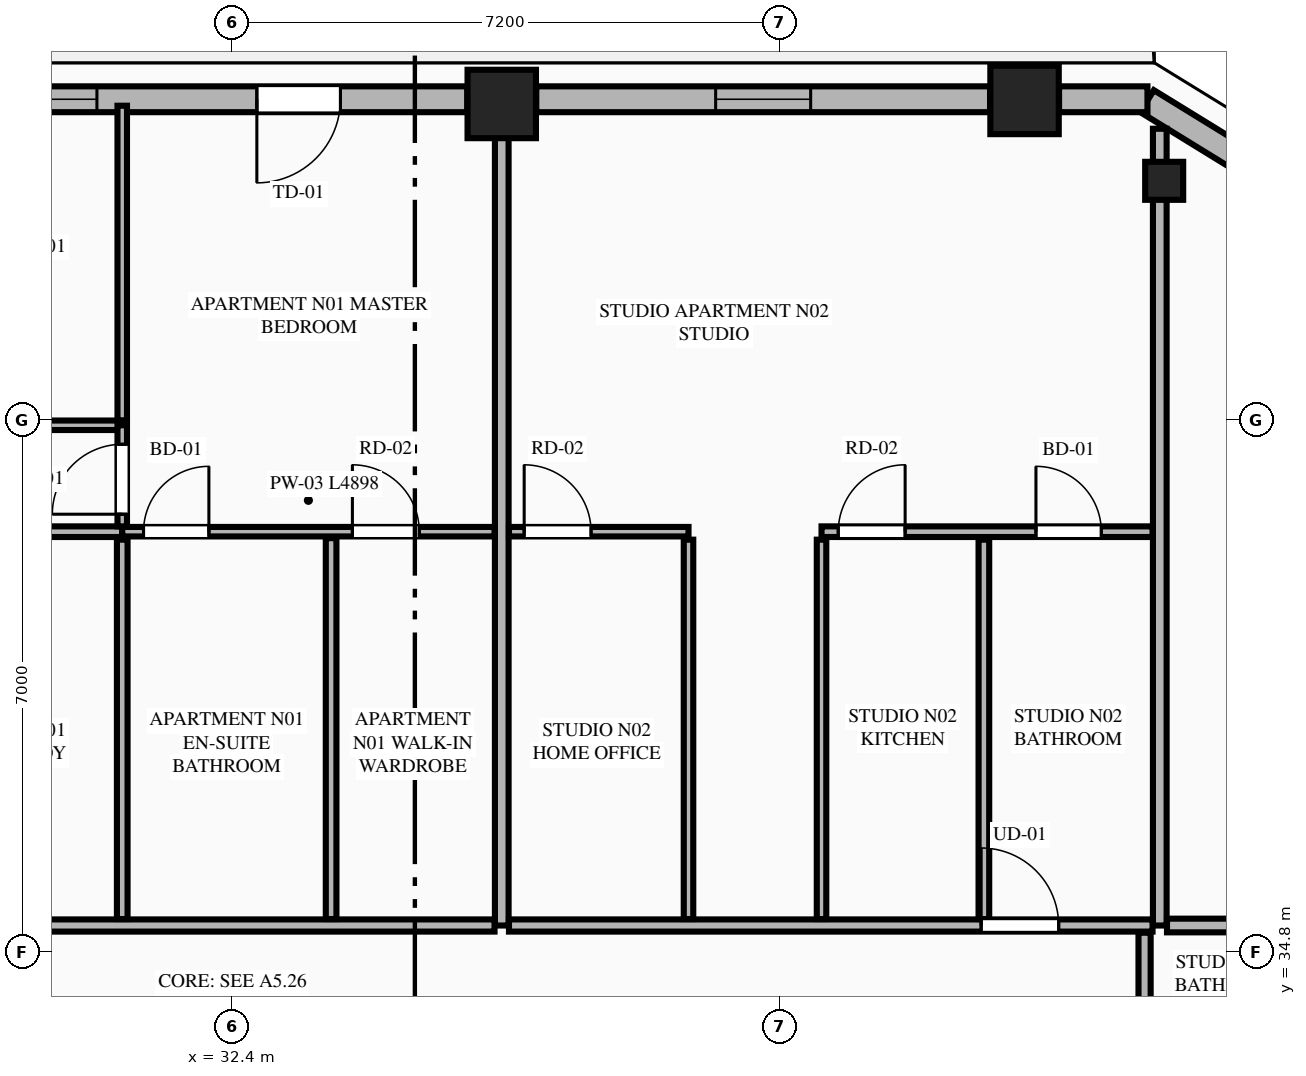
"""IFC4 building model, lengths in metres.
Left out: names, types, materials, properties, quantities, classifications, styles, units other than length and angle.
Written with IfcOpenShell. Run it as: python <this file> out.ifc"""

import sys

from ifc_helpers import new_model, si_unit, direction, frame, frame_2d, origin, origin_2d, place, context, subcontext, project, spatial, rectangle, extrude, element, fill, save


model = new_model("IFC4")
c1 = context("Model", 3, precision=1e-05, world=origin(), true_north=direction((0.0, 1.0)))
c2 = subcontext(c1, "Body", "Model", "MODEL_VIEW")
j1 = project(units=[si_unit("LENGTHUNIT", "METRE"), si_unit("PLANEANGLEUNIT", "RADIAN")], contexts=[c1])
p1 = place(None, origin())
s1 = spatial("IfcSite", under=j1, at=p1, CompositionType="ELEMENT")
p2 = place(p1, origin())
s2 = spatial("IfcBuilding", under=s1, at=p2, CompositionType="ELEMENT")
p3 = place(p2, frame((0.0, 0.0, 200.3)))
s3 = spatial("IfcBuildingStorey", under=s2, at=p3, CompositionType="ELEMENT", Elevation=200.3)
for number, where, z_axis, x_axis in (
    (1, (42.821, 46.011, 0.0), (0.0, 0.0, 1.0), (1.0, 0.0, 0.0)),
    (2, (35.943, 45.958, 0.0), (0.0, 0.0, 1.0), (1.0, 0.0, 0.0)),
):
    element("IfcColumn", number, at=place(p3, frame(where, z_axis=z_axis, x_axis=x_axis)), inside=s3, PredefinedType="COLUMN", context=c2, shape_type="SweptSolid", body=[
        extrude(rectangle(XDim=0.9, YDim=0.9, at=origin_2d()), origin(), (0.0, 0.0, 1.0), 3.55),
    ])
p4 = place(p3, frame((44.658, 44.947, 0.0), z_axis=(0.0, 0.0, 1.0), x_axis=(-0.865230187018, 0.501374833306, 0.0)))
e3 = element("IfcColumn", 3, at=p4, inside=s3, PredefinedType="PILASTER", context=c2, shape_type="SweptSolid", body=[
    extrude(rectangle(XDim=0.5, YDim=0.35, at=origin_2d()), origin(), (0.0, 0.0, 1.0), 3.55),
])
p5 = place(p3, frame((45.862, 45.116, 0.0), z_axis=(0.0, 0.0, 1.0), x_axis=(-0.851713271379, 0.524008113828, 0.0)))
e4 = element("IfcWall", 4, at=p5, inside=s3, PredefinedType="STANDARD", context=c2, shape_type="SweptSolid", body=[
    extrude(rectangle(XDim=1.678, YDim=0.34, at=frame_2d((0.839, 0.0))), origin(), (0.0, 0.0, 1.0), 3.35),
])
p6 = place(p3, frame((44.438, 46.02, 0.0), z_axis=(0.0, 0.0, 1.0), x_axis=(-1.0, 0.0, 0.0)))
e5 = element("IfcWall", 5, at=p6, inside=s3, PredefinedType="STANDARD", context=c2, shape_type="SweptSolid", body=[
    extrude(rectangle(XDim=1.163, YDim=0.34, at=frame_2d((0.582, 0.0))), origin(), (0.0, 0.0, 1.0), 3.35),
])
p7 = place(p3, frame((42.367, 46.02, 0.0), z_axis=(0.0, 0.0, 1.0), x_axis=(-1.0, 0.0, 0.0)))
e6 = element("IfcWall", 6, at=p7, inside=s3, PredefinedType="STANDARD", context=c2, shape_type="SweptSolid", body=[
    extrude(rectangle(XDim=5.97, YDim=0.34, at=frame_2d((2.985, 0.0))), origin(), (0.0, 0.0, 1.0), 2.883),
])
p8 = place(p7, frame((2.36, 0.0, 0.75)))
e7 = element("IfcOpeningElement", 7, at=p8, cuts=e6, PredefinedType="OPENING", context=c2, shape_type="SweptSolid", body=[
    extrude(rectangle(XDim=1.25, YDim=1.95, at=frame_2d((0.625, 0.975))), frame((0.0, 0.18, 0.0), z_axis=(0.0, -1.0, 0.0), x_axis=(1.0, 0.0, 0.0)), (0.0, 0.0, 1.0), 0.36),
])
p9 = place(p3, frame((35.489, 46.02, 0.0), z_axis=(0.0, 0.0, 1.0), x_axis=(-1.0, 0.0, 0.0)))
e8 = element("IfcWall", 8, at=p9, inside=s3, PredefinedType="STANDARD", context=c2, shape_type="SweptSolid", body=[
    extrude(rectangle(XDim=6.178, YDim=0.34, at=frame_2d((3.089, 0.0))), origin(), (0.0, 0.0, 1.0), 2.883),
])
p10 = place(p9, frame((1.668, 0.0, 0.0)))
e9 = element("IfcOpeningElement", 9, at=p10, cuts=e8, PredefinedType="OPENING", context=c2, shape_type="SweptSolid", body=[
    extrude(rectangle(XDim=1.1, YDim=2.25, at=frame_2d((0.55, 1.125))), frame((0.0, 0.18, 0.0), z_axis=(0.0, -1.0, 0.0), x_axis=(1.0, 0.0, 0.0)), (0.0, 0.0, 1.0), 0.36),
])
p11 = place(p9, frame((4.872, 0.0, 0.75)))
e10 = element("IfcOpeningElement", 10, at=p11, cuts=e8, PredefinedType="OPENING", context=c2, shape_type="SweptSolid", body=[
    extrude(rectangle(XDim=1.086, YDim=1.983, at=frame_2d((0.543, 0.991))), frame((0.0, 0.18, 0.0), z_axis=(0.0, -1.0, 0.0), x_axis=(1.0, 0.0, 0.0)), (0.0, 0.0, 1.0), 0.36),
])
p12 = place(p3, frame((35.943, 35.15, 0.0), z_axis=(0.0, 0.0, 1.0), x_axis=(0.0, 1.0, 0.0)))
e11 = element("IfcWall", 11, at=p12, inside=s3, PredefinedType="PARTITIONING", context=c2, shape_type="SweptSolid", body=[
    extrude(rectangle(XDim=10.695, YDim=0.18, at=frame_2d((5.348, 0.0))), origin(), (0.0, 0.0, 1.0), 2.807),
])
p13 = place(p3, frame((44.6, 35.15, 0.0), z_axis=(0.0, 0.0, 1.0), x_axis=(0.0, 1.0, 0.0)))
e12 = element("IfcWall", 12, at=p13, inside=s3, PredefinedType="PARTITIONING", context=c2, shape_type="SweptSolid", body=[
    extrude(rectangle(XDim=10.482, YDim=0.18, at=frame_2d((5.241, 0.0))), origin(), (0.0, 0.0, 1.0), 3.35),
])
p14 = place(p3, frame((20.295, 35.15, 0.0), z_axis=(0.0, 0.0, 1.0), x_axis=(1.0, 0.0, 0.0)))
e13 = element("IfcWall", 13, at=p14, inside=s3, PredefinedType="PARTITIONING", context=c2, shape_type="SweptSolid", body=[
    extrude(rectangle(XDim=15.553, YDim=0.16, at=frame_2d((7.776, 0.0))), origin(), (0.0, 0.0, 1.0), 3.35),
])
p15 = place(p14, frame((0.405, 0.0, 0.0)))
e14 = element("IfcOpeningElement", 14, at=p15, cuts=e13, PredefinedType="OPENING", context=c2, shape_type="SweptSolid", body=[
    extrude(rectangle(XDim=1.02, YDim=2.25, at=frame_2d((0.51, 1.125))), frame((0.0, 0.09, 0.0), z_axis=(0.0, -1.0, 0.0), x_axis=(1.0, 0.0, 0.0)), (0.0, 0.0, 1.0), 0.18),
])
p16 = place(p3, frame((27.442, 40.331, 0.0), z_axis=(0.0, 0.0, 1.0), x_axis=(1.0, 0.0, 0.0)))
e15 = element("IfcWall", 15, at=p16, inside=s3, PredefinedType="PLUMBINGWALL", context=c2, shape_type="SweptSolid", body=[
    extrude(rectangle(XDim=3.508, YDim=0.14, at=frame_2d((1.754, 0.0))), origin(), (0.0, 0.0, 1.0), 3.35),
])
p17 = place(p16, frame((0.3, 0.0, 0.0)))
e16 = element("IfcOpeningElement", 16, at=p17, cuts=e15, PredefinedType="OPENING", context=c2, shape_type="SweptSolid", body=[
    extrude(rectangle(XDim=0.88, YDim=2.15, at=frame_2d((0.44, 1.075))), frame((0.0, 0.08, 0.0), z_axis=(0.0, -1.0, 0.0), x_axis=(1.0, 0.0, 0.0)), (0.0, 0.0, 1.0), 0.16),
])
p18 = place(p3, frame((30.95, 40.331, 0.0), z_axis=(0.0, 0.0, 1.0), x_axis=(1.0, 0.0, 0.0)))
e17 = element("IfcWall", 17, at=p18, inside=s3, PredefinedType="PARTITIONING", context=c2, shape_type="SweptSolid", body=[
    extrude(rectangle(XDim=4.898, YDim=0.125, at=frame_2d((2.449, 0.0))), origin(), (0.0, 0.0, 1.0), 3.35),
])
p19 = place(p18, frame((0.28, 0.0, 0.0)))
e18 = element("IfcOpeningElement", 18, at=p19, cuts=e17, PredefinedType="OPENING", context=c2, shape_type="SweptSolid", body=[
    extrude(rectangle(XDim=0.86, YDim=2.1, at=frame_2d((0.43, 1.05))), frame((0.0, 0.073, 0.0), z_axis=(0.0, -1.0, 0.0), x_axis=(1.0, 0.0, 0.0)), (0.0, 0.0, 1.0), 0.145),
])
p20 = place(p18, frame((3.028, 0.0, 0.0)))
e19 = element("IfcOpeningElement", 19, at=p20, cuts=e17, PredefinedType="OPENING", context=c2, shape_type="SweptSolid", body=[
    extrude(rectangle(XDim=0.88, YDim=2.15, at=frame_2d((0.44, 1.075))), frame((0.0, 0.073, 0.0), z_axis=(0.0, -1.0, 0.0), x_axis=(1.0, 0.0, 0.0)), (0.0, 0.0, 1.0), 0.145),
])
p21 = place(p3, frame((27.442, 41.731, 0.0), z_axis=(0.0, 0.0, 1.0), x_axis=(1.0, 0.0, 0.0)))
e20 = element("IfcWall", 20, at=p21, inside=s3, PredefinedType="PARTITIONING", context=c2, shape_type="SweptSolid", body=[
    extrude(rectangle(XDim=3.508, YDim=0.125, at=frame_2d((1.754, 0.0))), origin(), (0.0, 0.0, 1.0), 3.35),
])
p22 = place(p21, frame((0.35, 0.0, 0.0)))
e21 = element("IfcOpeningElement", 21, at=p22, cuts=e20, PredefinedType="OPENING", context=c2, shape_type="SweptSolid", body=[
    extrude(rectangle(XDim=0.92, YDim=2.15, at=frame_2d((0.46, 1.075))), frame((0.0, 0.073, 0.0), z_axis=(0.0, -1.0, 0.0), x_axis=(1.0, 0.0, 0.0)), (0.0, 0.0, 1.0), 0.145),
])
p23 = place(p3, frame((30.95, 40.401, 0.0), z_axis=(0.0, 0.0, 1.0), x_axis=(0.0, 1.0, 0.0)))
e22 = element("IfcWall", 22, at=p23, inside=s3, PredefinedType="PARTITIONING", context=c2, shape_type="SweptSolid", body=[
    extrude(rectangle(XDim=1.33, YDim=0.125, at=frame_2d((0.665, 0.0))), origin(), (0.0, 0.0, 1.0), 3.35),
])
p24 = place(p23, frame((0.16, 0.0, 0.0)))
e23 = element("IfcOpeningElement", 23, at=p24, cuts=e22, PredefinedType="OPENING", context=c2, shape_type="SweptSolid", body=[
    extrude(rectangle(XDim=0.92, YDim=2.15, at=frame_2d((0.46, 1.075))), frame((0.0, 0.073, 0.0), z_axis=(0.0, -1.0, 0.0), x_axis=(1.0, 0.0, 0.0)), (0.0, 0.0, 1.0), 0.145),
])
p25 = place(p3, frame((30.95, 35.235, 0.0), z_axis=(0.0, 0.0, 1.0), x_axis=(0.0, 1.0, 0.0)))
e24 = element("IfcWall", 24, at=p25, inside=s3, PredefinedType="PLUMBINGWALL", context=c2, shape_type="SweptSolid", body=[
    extrude(rectangle(XDim=4.991, YDim=0.14, at=frame_2d((2.496, 0.0))), origin(), (0.0, 0.0, 1.0), 3.35),
])
p26 = place(p3, frame((30.95, 41.796, 0.0), z_axis=(0.0, 0.0, 1.0), x_axis=(0.0, 1.0, 0.0)))
e25 = element("IfcWall", 25, at=p26, inside=s3, PredefinedType="PARTITIONING", context=c2, shape_type="SweptSolid", body=[
    extrude(rectangle(XDim=4.139, YDim=0.125, at=frame_2d((2.07, 0.0))), origin(), (0.0, 0.0, 1.0), 3.35),
])
p27 = place(p3, frame((33.698, 35.235, 0.0), z_axis=(0.0, 0.0, 1.0), x_axis=(0.0, 1.0, 0.0)))
e26 = element("IfcWall", 26, at=p27, inside=s3, PredefinedType="PLUMBINGWALL", context=c2, shape_type="SweptSolid", body=[
    extrude(rectangle(XDim=5.011, YDim=0.14, at=frame_2d((2.505, 0.0))), origin(), (0.0, 0.0, 1.0), 3.35),
])
p28 = place(p3, frame((36.038, 35.15, 0.0), z_axis=(0.0, 0.0, 1.0), x_axis=(1.0, 0.0, 0.0)))
e27 = element("IfcWall", 27, at=p28, inside=s3, PredefinedType="PARTITIONING", context=c2, shape_type="SweptSolid", body=[
    extrude(rectangle(XDim=8.467, YDim=0.16, at=frame_2d((4.233, 0.0))), origin(), (0.0, 0.0, 1.0), 3.35),
])
p29 = place(p28, frame((6.212, 0.0, 0.0)))
e28 = element("IfcOpeningElement", 28, at=p29, cuts=e27, PredefinedType="OPENING", context=c2, shape_type="SweptSolid", body=[
    extrude(rectangle(XDim=1.02, YDim=2.25, at=frame_2d((0.51, 1.125))), frame((0.0, 0.09, 0.0), z_axis=(0.0, -1.0, 0.0), x_axis=(1.0, 0.0, 0.0)), (0.0, 0.0, 1.0), 0.18),
])
p30 = place(p3, frame((40.15, 35.235, 0.0), z_axis=(0.0, 0.0, 1.0), x_axis=(0.0, 1.0, 0.0)))
e29 = element("IfcWall", 29, at=p30, inside=s3, PredefinedType="PARTITIONING", context=c2, shape_type="SweptSolid", body=[
    extrude(rectangle(XDim=4.991, YDim=0.125, at=frame_2d((2.496, 0.0))), origin(), (0.0, 0.0, 1.0), 3.35),
])
p31 = place(p3, frame((40.15, 40.331, 0.0), z_axis=(0.0, 0.0, 1.0), x_axis=(1.0, 0.0, 0.0)))
e30 = element("IfcWall", 30, at=p31, inside=s3, PredefinedType="PLUMBINGWALL", context=c2, shape_type="SweptSolid", body=[
    extrude(rectangle(XDim=4.355, YDim=0.14, at=frame_2d((2.177, 0.0))), origin(), (0.0, 0.0, 1.0), 3.35),
])
p32 = place(p31, frame((2.821, 0.0, 0.0)))
e31 = element("IfcOpeningElement", 31, at=p32, cuts=e30, PredefinedType="OPENING", context=c2, shape_type="SweptSolid", body=[
    extrude(rectangle(XDim=0.86, YDim=2.1, at=frame_2d((0.43, 1.05))), frame((0.0, 0.08, 0.0), z_axis=(0.0, -1.0, 0.0), x_axis=(1.0, 0.0, 0.0)), (0.0, 0.0, 1.0), 0.16),
])
p33 = place(p31, frame((0.22, 0.0, 0.0)))
e32 = element("IfcOpeningElement", 32, at=p33, cuts=e30, PredefinedType="OPENING", context=c2, shape_type="SweptSolid", body=[
    extrude(rectangle(XDim=0.88, YDim=2.15, at=frame_2d((0.44, 1.075))), frame((0.0, 0.08, 0.0), z_axis=(0.0, -1.0, 0.0), x_axis=(1.0, 0.0, 0.0)), (0.0, 0.0, 1.0), 0.16),
])
p34 = place(p3, frame((42.286, 35.235, 0.0), z_axis=(0.0, 0.0, 1.0), x_axis=(0.0, 1.0, 0.0)))
e33 = element("IfcWall", 33, at=p34, inside=s3, PredefinedType="PLUMBINGWALL", context=c2, shape_type="SweptSolid", body=[
    extrude(rectangle(XDim=4.991, YDim=0.14, at=frame_2d((2.496, 0.0))), origin(), (0.0, 0.0, 1.0), 2.807),
])
p35 = place(p3, frame((38.4, 35.235, 0.0), z_axis=(0.0, 0.0, 1.0), x_axis=(0.0, 1.0, 0.0)))
e34 = element("IfcWall", 34, at=p35, inside=s3, PredefinedType="PARTITIONING", context=c2, shape_type="SweptSolid", body=[
    extrude(rectangle(XDim=4.991, YDim=0.125, at=frame_2d((2.496, 0.0))), origin(), (0.0, 0.0, 1.0), 3.35),
])
p36 = place(p3, frame((36.038, 40.331, 0.0), z_axis=(0.0, 0.0, 1.0), x_axis=(1.0, 0.0, 0.0)))
e35 = element("IfcWall", 35, at=p36, inside=s3, PredefinedType="PARTITIONING", context=c2, shape_type="SweptSolid", body=[
    extrude(rectangle(XDim=2.362, YDim=0.125, at=frame_2d((1.181, 0.0))), origin(), (0.0, 0.0, 1.0), 3.35),
])
p37 = place(p36, frame((0.2, 0.0, 0.0)))
e36 = element("IfcOpeningElement", 36, at=p37, cuts=e35, PredefinedType="OPENING", context=c2, shape_type="SweptSolid", body=[
    extrude(rectangle(XDim=0.88, YDim=2.15, at=frame_2d((0.44, 1.075))), frame((0.0, 0.073, 0.0), z_axis=(0.0, -1.0, 0.0), x_axis=(1.0, 0.0, 0.0)), (0.0, 0.0, 1.0), 0.145),
])
p38 = place(p3, frame((44.695, 35.15, 0.0), z_axis=(0.0, 0.0, 1.0), x_axis=(1.0, 0.0, 0.0)))
e37 = element("IfcWall", 37, at=p38, inside=s3, PredefinedType="PARTITIONING", context=c2, shape_type="SweptSolid", body=[
    extrude(rectangle(XDim=5.995, YDim=0.18, at=frame_2d((2.998, 0.0))), origin(), (0.0, 0.0, 1.0), 3.35),
])
p39 = place(p3, frame((44.4, 29.008, 0.0), z_axis=(0.0, 0.0, 1.0), x_axis=(0.0, 1.0, 0.0)))
e38 = element("IfcWall", 38, at=p39, inside=s3, PredefinedType="PARTITIONING", context=c2, shape_type="SweptSolid", body=[
    extrude(rectangle(XDim=6.047, YDim=0.16, at=frame_2d((3.023, 0.0))), origin(), (0.0, 0.0, 1.0), 3.35),
])
p40 = place(p39, frame((0.4, 0.0, 0.0)))
e39 = element("IfcOpeningElement", 39, at=p40, cuts=e38, PredefinedType="OPENING", context=c2, shape_type="SweptSolid", body=[
    extrude(rectangle(XDim=1.02, YDim=2.25, at=frame_2d((0.51, 1.125))), frame((0.0, 0.09, 0.0), z_axis=(0.0, -1.0, 0.0), x_axis=(1.0, 0.0, 0.0)), (0.0, 0.0, 1.0), 0.18),
])
p41 = place(p8, origin())
e40 = element("IfcWindow", 40, at=p41, inside=s3, PartitioningType="SINGLE_PANEL", PredefinedType="WINDOW", context=c2, shape_type="SweptSolid", body=[
    extrude(rectangle(XDim=1.25, YDim=1.95, at=frame_2d((0.625, 0.975))), frame((0.0, 0.03, 0.0), z_axis=(0.0, -1.0, 0.0), x_axis=(1.0, 0.0, 0.0)), (0.0, 0.0, 1.0), 0.06),
])
fill(e7, e40)
p42 = place(p10, origin())
e41 = element("IfcDoor", 41, at=p42, inside=s3, OperationType="SINGLE_SWING_RIGHT", PredefinedType="DOOR", context=c2, shape_type="SweptSolid", body=[
    extrude(rectangle(XDim=1.1, YDim=2.25, at=frame_2d((0.55, 1.125))), frame((0.0, 0.025, 0.0), z_axis=(0.0, -1.0, 0.0), x_axis=(1.0, 0.0, 0.0)), (0.0, 0.0, 1.0), 0.05),
])
fill(e9, e41)
p43 = place(p19, origin())
e42 = element("IfcDoor", 42, at=p43, inside=s3, OperationType="SINGLE_SWING_RIGHT", PredefinedType="DOOR", context=c2, shape_type="SweptSolid", body=[
    extrude(rectangle(XDim=0.86, YDim=2.1, at=frame_2d((0.43, 1.05))), frame((0.0, 0.025, 0.0), z_axis=(0.0, -1.0, 0.0), x_axis=(1.0, 0.0, 0.0)), (0.0, 0.0, 1.0), 0.05),
])
fill(e18, e42)
p44 = place(p20, origin())
e43 = element("IfcDoor", 43, at=p44, inside=s3, OperationType="SINGLE_SWING_LEFT", PredefinedType="DOOR", context=c2, shape_type="SweptSolid", body=[
    extrude(rectangle(XDim=0.88, YDim=2.15, at=frame_2d((0.44, 1.075))), frame((0.0, 0.025, 0.0), z_axis=(0.0, -1.0, 0.0), x_axis=(1.0, 0.0, 0.0)), (0.0, 0.0, 1.0), 0.05),
])
fill(e19, e43)
p45 = place(p24, origin())
e44 = element("IfcDoor", 44, at=p45, inside=s3, OperationType="SINGLE_SWING_LEFT", PredefinedType="DOOR", context=c2, shape_type="SweptSolid", body=[
    extrude(rectangle(XDim=0.92, YDim=2.15, at=frame_2d((0.46, 1.075))), frame((0.0, 0.025, 0.0), z_axis=(0.0, -1.0, 0.0), x_axis=(1.0, 0.0, 0.0)), (0.0, 0.0, 1.0), 0.05),
])
fill(e23, e44)
p46 = place(p37, origin())
e45 = element("IfcDoor", 45, at=p46, inside=s3, OperationType="SINGLE_SWING_LEFT", PredefinedType="DOOR", context=c2, shape_type="SweptSolid", body=[
    extrude(rectangle(XDim=0.88, YDim=2.15, at=frame_2d((0.44, 1.075))), frame((0.0, 0.025, 0.0), z_axis=(0.0, -1.0, 0.0), x_axis=(1.0, 0.0, 0.0)), (0.0, 0.0, 1.0), 0.05),
])
fill(e36, e45)
p47 = place(p32, origin())
e46 = element("IfcDoor", 46, at=p47, inside=s3, OperationType="SINGLE_SWING_LEFT", PredefinedType="DOOR", context=c2, shape_type="SweptSolid", body=[
    extrude(rectangle(XDim=0.86, YDim=2.1, at=frame_2d((0.43, 1.05))), frame((0.0, 0.025, 0.0), z_axis=(0.0, -1.0, 0.0), x_axis=(1.0, 0.0, 0.0)), (0.0, 0.0, 1.0), 0.05),
])
fill(e31, e46)
p48 = place(p29, origin())
e47 = element("IfcDoor", 47, at=p48, inside=s3, OperationType="SINGLE_SWING_LEFT", PredefinedType="DOOR", context=c2, shape_type="SweptSolid", body=[
    extrude(rectangle(XDim=1.02, YDim=2.25, at=frame_2d((0.51, 1.125))), frame((0.0, 0.025, 0.0), z_axis=(0.0, -1.0, 0.0), x_axis=(1.0, 0.0, 0.0)), (0.0, 0.0, 1.0), 0.05),
])
fill(e28, e47)
p49 = place(p33, origin())
e48 = element("IfcDoor", 48, at=p49, inside=s3, OperationType="SINGLE_SWING_RIGHT", PredefinedType="DOOR", context=c2, shape_type="SweptSolid", body=[
    extrude(rectangle(XDim=0.88, YDim=2.15, at=frame_2d((0.44, 1.075))), frame((0.0, 0.025, 0.0), z_axis=(0.0, -1.0, 0.0), x_axis=(1.0, 0.0, 0.0)), (0.0, 0.0, 1.0), 0.05),
])
fill(e32, e48)
p50 = place(p11, origin())
e49 = element("IfcWindow", 49, at=p50, inside=s3, PartitioningType="SINGLE_PANEL", PredefinedType="WINDOW", context=c2, shape_type="SweptSolid", body=[
    extrude(rectangle(XDim=1.086, YDim=1.983, at=frame_2d((0.543, 0.991))), frame((0.0, 0.03, 0.0), z_axis=(0.0, -1.0, 0.0), x_axis=(1.0, 0.0, 0.0)), (0.0, 0.0, 1.0), 0.06),
])
fill(e10, e49)
save(model, sys.argv[1])
